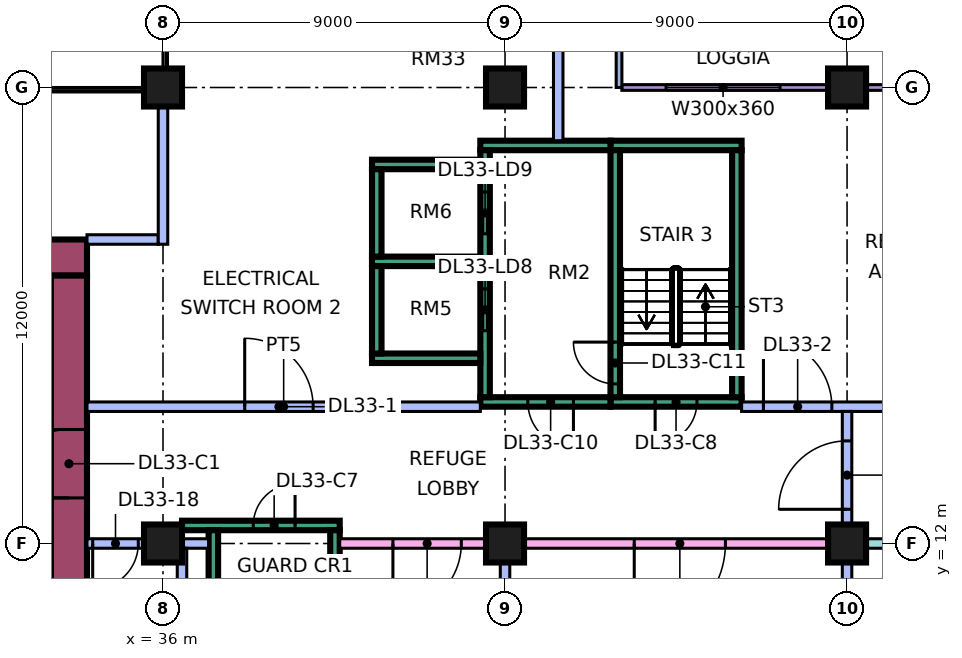
"""IFC4 building model, lengths in metres.
Left out: names, types, materials, properties, quantities, classifications, styles, units other than length and angle.
Written with IfcOpenShell. Run it as: python <this file> out.ifc"""

import sys

from ifc_helpers import new_model, si_unit, direction, frame, frame_2d, origin, origin_2d, place, context, subcontext, project, spatial, rectangle, extrude, element, fill, save


model = new_model("IFC4")
c1 = context("Model", 3, precision=1e-05, world=origin(), true_north=direction((0.0, 1.0)))
c2 = subcontext(c1, "Body", "Model", "MODEL_VIEW")
j1 = project(units=[si_unit("LENGTHUNIT", "METRE"), si_unit("PLANEANGLEUNIT", "RADIAN")], contexts=[c1])
p1 = place(None, origin())
s1 = spatial("IfcSite", under=j1, at=p1, CompositionType="ELEMENT")
p2 = place(p1, origin())
s2 = spatial("IfcBuilding", under=s1, at=p2, CompositionType="ELEMENT")
p3 = place(p2, frame((0.0, 0.0, 140.65)))
s3 = spatial("IfcBuildingStorey", under=s2, at=p3, CompositionType="ELEMENT", Elevation=140.65)
for number, where, z_axis, x_axis in (
    (1, (36.0, 12.0, 0.0), (0.0, 0.0, 1.0), (1.0, 0.0, 0.0)),
    (2, (36.0, 24.0, 0.0), (0.0, 0.0, 1.0), (1.0, 0.0, 0.0)),
    (3, (45.0, 12.0, 0.0), (0.0, 0.0, 1.0), (1.0, 0.0, 0.0)),
    (4, (45.0, 24.0, 0.0), (0.0, 0.0, 1.0), (1.0, 0.0, 0.0)),
    (5, (54.0, 12.0, 0.0), (0.0, 0.0, 1.0), (1.0, 0.0, 0.0)),
    (6, (54.0, 24.0, 0.0), (0.0, 0.0, 1.0), (1.0, 0.0, 0.0)),
):
    element("IfcColumn", number, at=place(p3, frame(where, z_axis=z_axis, x_axis=x_axis)), inside=s3, PredefinedType="COLUMN", context=c2, shape_type="SweptSolid", body=[
        extrude(rectangle(XDim=1.0, YDim=1.0, at=origin_2d()), origin(), (0.0, 0.0, 1.0), 5.5),
    ])
p4 = place(p3, frame((9.0, 19.525, 0.0), z_axis=(0.0, 0.0, 1.0), x_axis=(1.0, 0.0, 0.0)))
e7 = element("IfcWall", 7, at=p4, inside=s3, PredefinedType="SHEAR", context=c2, shape_type="SweptSolid", body=[
    extrude(rectangle(XDim=25.0, YDim=0.95, at=frame_2d((12.5, 0.0))), origin(), (0.0, 0.0, 1.0), 5.5),
])
p5 = place(p4, frame((19.1, 0.0, 0.0)))
e8 = element("IfcOpeningElement", 8, at=p5, cuts=e7, PredefinedType="OPENING", context=c2, shape_type="SweptSolid", body=[
    extrude(rectangle(XDim=1.8, YDim=2.4, at=frame_2d((0.9, 1.2))), frame((0.0, 0.485, 0.0), z_axis=(0.0, -1.0, 0.0), x_axis=(1.0, 0.0, 0.0)), (0.0, 0.0, 1.0), 0.97),
])
p6 = place(p3, frame((33.525, 7.95, 0.0), z_axis=(0.0, 0.0, 1.0), x_axis=(0.0, 1.0, 0.0)))
e9 = element("IfcWall", 9, at=p6, inside=s3, PredefinedType="SHEAR", context=c2, shape_type="SweptSolid", body=[
    extrude(rectangle(XDim=11.1, YDim=0.95, at=frame_2d((5.55, 0.0))), origin(), (0.0, 0.0, 1.0), 5.5),
])
p7 = place(p6, frame((5.25, 0.0, 0.0)))
e10 = element("IfcOpeningElement", 10, at=p7, cuts=e9, PredefinedType="OPENING", context=c2, shape_type="SweptSolid", body=[
    extrude(rectangle(XDim=1.8, YDim=2.4, at=frame_2d((0.9, 1.2))), frame((0.0, 0.485, 0.0), z_axis=(0.0, -1.0, 0.0), x_axis=(1.0, 0.0, 0.0)), (0.0, 0.0, 1.0), 0.97),
])
p8 = place(p3, frame((36.5, 12.475, 0.0), z_axis=(0.0, 0.0, 1.0), x_axis=(1.0, 0.0, 0.0)))
e11 = element("IfcWall", 11, at=p8, inside=s3, PredefinedType="SHEAR", context=c2, shape_type="SweptSolid", body=[
    extrude(rectangle(XDim=4.15, YDim=0.25, at=frame_2d((2.075, 0.0))), origin(), (0.0, 0.0, 1.0), 5.5),
])
p9 = place(p8, frame((1.875, 0.0, 0.0)))
e12 = element("IfcOpeningElement", 12, at=p9, cuts=e11, PredefinedType="OPENING", context=c2, shape_type="SweptSolid", body=[
    extrude(rectangle(XDim=1.1, YDim=2.2, at=frame_2d((0.55, 1.1))), frame((0.0, 0.135, 0.0), z_axis=(0.0, -1.0, 0.0), x_axis=(1.0, 0.0, 0.0)), (0.0, 0.0, 1.0), 0.27),
])
for number, where, z_axis, x_axis in (
    (13, (37.325, 5.85, 0.0), (0.0, 0.0, 1.0), (0.0, 1.0, 0.0)),
    (14, (40.525, 5.85, 0.0), (0.0, 0.0, 1.0), (0.0, 1.0, 0.0)),
):
    element("IfcWall", number, at=place(p3, frame(where, z_axis=z_axis, x_axis=x_axis)), inside=s3, PredefinedType="SHEAR", context=c2, shape_type="SweptSolid", body=[
        extrude(rectangle(XDim=6.5, YDim=0.25, at=frame_2d((3.25, 0.0))), origin(), (0.0, 0.0, 1.0), 5.5),
    ])
p10 = place(p3, frame((47.775, 15.725, 0.0), z_axis=(0.0, 0.0, 1.0), x_axis=(1.0, 0.0, 0.0)))
e15 = element("IfcWall", 15, at=p10, inside=s3, PredefinedType="SHEAR", context=c2, shape_type="SweptSolid", body=[
    extrude(rectangle(XDim=3.45, YDim=0.25, at=frame_2d((1.725, 0.0))), origin(), (0.0, 0.0, 1.0), 5.5),
])
p11 = place(p10, frame((1.175, 0.0, 0.0)))
e16 = element("IfcOpeningElement", 16, at=p11, cuts=e15, PredefinedType="OPENING", context=c2, shape_type="SweptSolid", body=[
    extrude(rectangle(XDim=1.1, YDim=2.2, at=frame_2d((0.55, 1.1))), frame((0.0, 0.135, 0.0), z_axis=(0.0, -1.0, 0.0), x_axis=(1.0, 0.0, 0.0)), (0.0, 0.0, 1.0), 0.27),
])
p12 = place(p3, frame((47.775, 22.475, 0.0), z_axis=(0.0, 0.0, 1.0), x_axis=(1.0, 0.0, 0.0)))
e17 = element("IfcWall", 17, at=p12, inside=s3, PredefinedType="SHEAR", context=c2, shape_type="SweptSolid", body=[
    extrude(rectangle(XDim=3.45, YDim=0.25, at=frame_2d((1.725, 0.0))), origin(), (0.0, 0.0, 1.0), 5.5),
])
p13 = place(p3, frame((47.9, 15.85, 0.0), z_axis=(0.0, 0.0, 1.0), x_axis=(0.0, 1.0, 0.0)))
e18 = element("IfcWall", 18, at=p13, inside=s3, PredefinedType="SHEAR", context=c2, shape_type="SweptSolid", body=[
    extrude(rectangle(XDim=6.5, YDim=0.25, at=frame_2d((3.25, 0.0))), origin(), (0.0, 0.0, 1.0), 5.5),
])
p14 = place(p13, frame((0.35, 0.0, 0.0)))
e19 = element("IfcOpeningElement", 19, at=p14, cuts=e18, PredefinedType="OPENING", context=c2, shape_type="SweptSolid", body=[
    extrude(rectangle(XDim=1.1, YDim=2.2, at=frame_2d((0.55, 1.1))), frame((0.0, 0.135, 0.0), z_axis=(0.0, -1.0, 0.0), x_axis=(1.0, 0.0, 0.0)), (0.0, 0.0, 1.0), 0.27),
])
p15 = place(p3, frame((51.1, 15.85, 0.0), z_axis=(0.0, 0.0, 1.0), x_axis=(0.0, 1.0, 0.0)))
e20 = element("IfcWall", 20, at=p15, inside=s3, PredefinedType="SHEAR", context=c2, shape_type="SweptSolid", body=[
    extrude(rectangle(XDim=6.5, YDim=0.25, at=frame_2d((3.25, 0.0))), origin(), (0.0, 0.0, 1.0), 5.5),
])
p16 = place(p3, frame((44.35, 15.725, 0.0), z_axis=(0.0, 0.0, 1.0), x_axis=(1.0, 0.0, 0.0)))
e21 = element("IfcWall", 21, at=p16, inside=s3, PredefinedType="SHEAR", context=c2, shape_type="SweptSolid", body=[
    extrude(rectangle(XDim=3.425, YDim=0.25, at=frame_2d((1.712, 0.0))), origin(), (0.0, 0.0, 1.0), 5.5),
])
p17 = place(p16, frame((1.25, 0.0, 0.0)))
e22 = element("IfcOpeningElement", 22, at=p17, cuts=e21, PredefinedType="OPENING", context=c2, shape_type="SweptSolid", body=[
    extrude(rectangle(XDim=1.2, YDim=2.2, at=frame_2d((0.6, 1.1))), frame((0.0, 0.135, 0.0), z_axis=(0.0, -1.0, 0.0), x_axis=(1.0, 0.0, 0.0)), (0.0, 0.0, 1.0), 0.27),
])
p18 = place(p3, frame((44.35, 22.475, 0.0), z_axis=(0.0, 0.0, 1.0), x_axis=(1.0, 0.0, 0.0)))
e23 = element("IfcWall", 23, at=p18, inside=s3, PredefinedType="SHEAR", context=c2, shape_type="SweptSolid", body=[
    extrude(rectangle(XDim=3.425, YDim=0.25, at=frame_2d((1.712, 0.0))), origin(), (0.0, 0.0, 1.0), 5.5),
])
p19 = place(p3, frame((44.475, 15.85, 0.0), z_axis=(0.0, 0.0, 1.0), x_axis=(0.0, 1.0, 0.0)))
e24 = element("IfcWall", 24, at=p19, inside=s3, PredefinedType="SHEAR", context=c2, shape_type="SweptSolid", body=[
    extrude(rectangle(XDim=6.5, YDim=0.25, at=frame_2d((3.25, 0.0))), origin(), (0.0, 0.0, 1.0), 5.5),
])
p20 = place(p19, frame((1.75, 0.0, 0.0)))
e25 = element("IfcOpeningElement", 25, at=p20, cuts=e24, PredefinedType="OPENING", context=c2, shape_type="SweptSolid", body=[
    extrude(rectangle(XDim=1.1, YDim=2.2, at=frame_2d((0.55, 1.1))), frame((0.0, 0.135, 0.0), z_axis=(0.0, -1.0, 0.0), x_axis=(1.0, 0.0, 0.0)), (0.0, 0.0, 1.0), 0.27),
])
p21 = place(p19, frame((4.3, 0.0, 0.0)))
e26 = element("IfcOpeningElement", 26, at=p21, cuts=e24, PredefinedType="OPENING", context=c2, shape_type="SweptSolid", body=[
    extrude(rectangle(XDim=1.1, YDim=2.2, at=frame_2d((0.55, 1.1))), frame((0.0, 0.135, 0.0), z_axis=(0.0, -1.0, 0.0), x_axis=(1.0, 0.0, 0.0)), (0.0, 0.0, 1.0), 0.27),
])
for number, where, z_axis, x_axis in (
    (27, (41.5, 16.875, 0.0), (0.0, 0.0, 1.0), (1.0, 0.0, 0.0)),
    (28, (41.5, 19.425, 0.0), (0.0, 0.0, 1.0), (1.0, 0.0, 0.0)),
    (29, (41.5, 21.975, 0.0), (0.0, 0.0, 1.0), (1.0, 0.0, 0.0)),
):
    element("IfcWall", number, at=place(p3, frame(where, z_axis=z_axis, x_axis=x_axis)), inside=s3, PredefinedType="SHEAR", context=c2, shape_type="SweptSolid", body=[
        extrude(rectangle(XDim=2.85, YDim=0.25, at=frame_2d((1.425, 0.0))), origin(), (0.0, 0.0, 1.0), 5.5),
    ])
for number, where, z_axis, x_axis in (
    (30, (41.625, 17.0, 0.0), (0.0, 0.0, 1.0), (0.0, 1.0, 0.0)),
    (31, (41.625, 19.55, 0.0), (0.0, 0.0, 1.0), (0.0, 1.0, 0.0)),
):
    element("IfcWall", number, at=place(p3, frame(where, z_axis=z_axis, x_axis=x_axis)), inside=s3, PredefinedType="SHEAR", context=c2, shape_type="SweptSolid", body=[
        extrude(rectangle(XDim=2.3, YDim=0.25, at=frame_2d((1.15, 0.0))), origin(), (0.0, 0.0, 1.0), 5.5),
    ])
p22 = place(p3, frame((59.925, 24.0, 0.0), z_axis=(0.0, 0.0, 1.0), x_axis=(-1.0, 0.0, 0.0)))
e32 = element("IfcWall", 32, at=p22, inside=s3, PredefinedType="SOLIDWALL", context=c2, shape_type="SweptSolid", body=[
    extrude(rectangle(XDim=11.85, YDim=0.15, at=frame_2d((5.925, 0.0))), origin(), (0.0, 0.0, 1.0), 5.05),
])
p23 = place(p22, frame((1.725, 0.0, 0.45)))
e33 = element("IfcOpeningElement", 33, at=p23, cuts=e32, PredefinedType="OPENING", context=c2, shape_type="SweptSolid", body=[
    extrude(rectangle(XDim=3.0, YDim=3.6, at=frame_2d((1.5, 1.8))), frame((0.0, 0.085, 0.0), z_axis=(0.0, -1.0, 0.0), x_axis=(1.0, 0.0, 0.0)), (0.0, 0.0, 1.0), 0.17),
])
p24 = place(p22, frame((7.688, 0.0, 0.45)))
e34 = element("IfcOpeningElement", 34, at=p24, cuts=e32, PredefinedType="OPENING", context=c2, shape_type="SweptSolid", body=[
    extrude(rectangle(XDim=3.0, YDim=3.6, at=frame_2d((1.5, 1.8))), frame((0.0, 0.085, 0.0), z_axis=(0.0, -1.0, 0.0), x_axis=(1.0, 0.0, 0.0)), (0.0, 0.0, 1.0), 0.17),
])
p25 = place(p3, frame((48.0, 25.5, 0.0), z_axis=(0.0, 0.0, 1.0), x_axis=(0.0, -1.0, 0.0)))
e35 = element("IfcWall", 35, at=p25, inside=s3, PredefinedType="SOLIDWALL", context=c2, shape_type="SweptSolid", body=[
    extrude(rectangle(XDim=1.5, YDim=0.15, at=frame_2d((0.75, 0.0))), origin(), (0.0, 0.0, 1.0), 5.05),
])
p26 = place(p3, frame((34.0, 12.0, 0.0), z_axis=(0.0, 0.0, 1.0), x_axis=(1.0, 0.0, 0.0)))
e36 = element("IfcWall", 36, at=p26, inside=s3, PredefinedType="PARTITIONING", context=c2, shape_type="SweptSolid", body=[
    extrude(rectangle(XDim=3.2, YDim=0.25, at=frame_2d((1.6, 0.0))), origin(), (0.0, 0.0, 1.0), 5.05),
])
p27 = place(p26, frame((0.15, 0.0, 0.0)))
e37 = element("IfcOpeningElement", 37, at=p27, cuts=e36, PredefinedType="OPENING", context=c2, shape_type="SweptSolid", body=[
    extrude(rectangle(XDim=1.2, YDim=2.1, at=frame_2d((0.6, 1.05))), frame((0.0, 0.135, 0.0), z_axis=(0.0, -1.0, 0.0), x_axis=(1.0, 0.0, 0.0)), (0.0, 0.0, 1.0), 0.27),
])
p28 = place(p3, frame((34.0, 15.6, 0.0), z_axis=(0.0, 0.0, 1.0), x_axis=(1.0, 0.0, 0.0)))
e38 = element("IfcWall", 38, at=p28, inside=s3, PredefinedType="PARTITIONING", context=c2, shape_type="SweptSolid", body=[
    extrude(rectangle(XDim=10.35, YDim=0.25, at=frame_2d((5.175, 0.0))), origin(), (0.0, 0.0, 1.0), 5.05),
])
p29 = place(p28, frame((4.15, 0.0, 0.0)))
e39 = element("IfcOpeningElement", 39, at=p29, cuts=e38, PredefinedType="OPENING", context=c2, shape_type="SweptSolid", body=[
    extrude(rectangle(XDim=1.8, YDim=2.1, at=frame_2d((0.9, 1.05))), frame((0.0, 0.135, 0.0), z_axis=(0.0, -1.0, 0.0), x_axis=(1.0, 0.0, 0.0)), (0.0, 0.0, 1.0), 0.27),
])
p30 = place(p3, frame((34.0, 20.0, 0.0), z_axis=(0.0, 0.0, 1.0), x_axis=(1.0, 0.0, 0.0)))
e40 = element("IfcWall", 40, at=p30, inside=s3, PredefinedType="PARTITIONING", context=c2, shape_type="SweptSolid", body=[
    extrude(rectangle(XDim=1.875, YDim=0.25, at=frame_2d((0.938, 0.0))), origin(), (0.0, 0.0, 1.0), 5.05),
])
p31 = place(p3, frame((36.0, 19.875, 0.0), z_axis=(0.0, 0.0, 1.0), x_axis=(0.0, 1.0, 0.0)))
e41 = element("IfcWall", 41, at=p31, inside=s3, PredefinedType="PARTITIONING", context=c2, shape_type="SweptSolid", body=[
    extrude(rectangle(XDim=4.125, YDim=0.25, at=frame_2d((2.062, 0.0))), origin(), (0.0, 0.0, 1.0), 5.05),
])
p32 = place(p3, frame((36.5, 6.875, 0.0), z_axis=(0.0, 0.0, 1.0), x_axis=(0.0, 1.0, 0.0)))
e42 = element("IfcWall", 42, at=p32, inside=s3, PredefinedType="PARTITIONING", context=c2, shape_type="SweptSolid", body=[
    extrude(rectangle(XDim=5.0, YDim=0.25, at=frame_2d((2.5, 0.0))), origin(), (0.0, 0.0, 1.0), 5.05),
])
p33 = place(p3, frame((40.65, 12.0, 0.0), z_axis=(0.0, 0.0, 1.0), x_axis=(1.0, 0.0, 0.0)))
e43 = element("IfcWall", 43, at=p33, inside=s3, PredefinedType="PARTITIONING", context=c2, shape_type="SweptSolid", body=[
    extrude(rectangle(XDim=13.225, YDim=0.25, at=frame_2d((6.613, 0.0))), origin(), (0.0, 0.0, 1.0), 2.45),
])
p34 = place(p33, frame((1.4, 0.0, 0.0)))
e44 = element("IfcOpeningElement", 44, at=p34, cuts=e43, PredefinedType="OPENING", context=c2, shape_type="SweptSolid", body=[
    extrude(rectangle(XDim=1.8, YDim=2.1, at=frame_2d((0.9, 1.05))), frame((0.0, 0.135, 0.0), z_axis=(0.0, -1.0, 0.0), x_axis=(1.0, 0.0, 0.0)), (0.0, 0.0, 1.0), 0.27),
])
p35 = place(p33, frame((7.75, 0.0, 0.0)))
e45 = element("IfcOpeningElement", 45, at=p35, cuts=e43, PredefinedType="OPENING", context=c2, shape_type="SweptSolid", body=[
    extrude(rectangle(XDim=2.4, YDim=2.1, at=frame_2d((1.2, 1.05))), frame((0.0, 0.135, 0.0), z_axis=(0.0, -1.0, 0.0), x_axis=(1.0, 0.0, 0.0)), (0.0, 0.0, 1.0), 0.27),
])
p36 = place(p3, frame((45.0, 0.0, 0.0), z_axis=(0.0, 0.0, 1.0), x_axis=(0.0, 1.0, 0.0)))
e46 = element("IfcWall", 46, at=p36, inside=s3, PredefinedType="PARTITIONING", context=c2, shape_type="SweptSolid", body=[
    extrude(rectangle(XDim=11.875, YDim=0.25, at=frame_2d((5.938, 0.0))), origin(), (0.0, 0.0, 1.0), 5.05),
])
p37 = place(p3, frame((46.4, 22.6, 0.0), z_axis=(0.0, 0.0, 1.0), x_axis=(0.0, 1.0, 0.0)))
e47 = element("IfcWall", 47, at=p37, inside=s3, PredefinedType="PARTITIONING", context=c2, shape_type="SweptSolid", body=[
    extrude(rectangle(XDim=2.75, YDim=0.25, at=frame_2d((1.375, 0.0))), origin(), (0.0, 0.0, 1.0), 5.05),
])
p38 = place(p3, frame((51.225, 15.6, 0.0), z_axis=(0.0, 0.0, 1.0), x_axis=(1.0, 0.0, 0.0)))
e48 = element("IfcWall", 48, at=p38, inside=s3, PredefinedType="PARTITIONING", context=c2, shape_type="SweptSolid", body=[
    extrude(rectangle(XDim=7.575, YDim=0.25, at=frame_2d((3.788, 0.0))), origin(), (0.0, 0.0, 1.0), 5.05),
])
p39 = place(p38, frame((0.575, 0.0, 0.0)))
e49 = element("IfcOpeningElement", 49, at=p39, cuts=e48, PredefinedType="OPENING", context=c2, shape_type="SweptSolid", body=[
    extrude(rectangle(XDim=1.8, YDim=2.1, at=frame_2d((0.9, 1.05))), frame((0.0, 0.135, 0.0), z_axis=(0.0, -1.0, 0.0), x_axis=(1.0, 0.0, 0.0)), (0.0, 0.0, 1.0), 0.27),
])
p40 = place(p3, frame((54.0, 0.074, 0.0), z_axis=(0.0, 0.0, 1.0), x_axis=(0.0, 1.0, 0.0)))
e50 = element("IfcWall", 50, at=p40, inside=s3, PredefinedType="PARTITIONING", context=c2, shape_type="SweptSolid", body=[
    extrude(rectangle(XDim=15.401, YDim=0.25, at=frame_2d((7.701, 0.0))), origin(), (0.0, 0.0, 1.0), 5.05),
])
p41 = place(p40, frame((12.826, 0.0, 0.0)))
e51 = element("IfcOpeningElement", 51, at=p41, cuts=e50, PredefinedType="OPENING", context=c2, shape_type="SweptSolid", body=[
    extrude(rectangle(XDim=1.8, YDim=2.1, at=frame_2d((0.9, 1.05))), frame((0.0, 0.135, 0.0), z_axis=(0.0, -1.0, 0.0), x_axis=(1.0, 0.0, 0.0)), (0.0, 0.0, 1.0), 0.27),
])
p42 = place(p3, frame((54.125, 12.0, 0.0), z_axis=(0.0, 0.0, 1.0), x_axis=(1.0, 0.0, 0.0)))
e52 = element("IfcWall", 52, at=p42, inside=s3, PredefinedType="PARTITIONING", context=c2, shape_type="SweptSolid", body=[
    extrude(rectangle(XDim=17.875, YDim=0.25, at=frame_2d((8.938, 0.0))), origin(), (0.0, 0.0, 1.0), 2.45),
])
p43 = place(p42, frame((3.275, 0.0, 0.0)))
e53 = element("IfcOpeningElement", 53, at=p43, cuts=e52, PredefinedType="OPENING", context=c2, shape_type="SweptSolid", body=[
    extrude(rectangle(XDim=2.4, YDim=2.1, at=frame_2d((1.2, 1.05))), frame((0.0, 0.135, 0.0), z_axis=(0.0, -1.0, 0.0), x_axis=(1.0, 0.0, 0.0)), (0.0, 0.0, 1.0), 0.27),
])
p44 = place(p24, origin())
e54 = element("IfcWindow", 54, at=p44, inside=s3, PartitioningType="SINGLE_PANEL", PredefinedType="WINDOW", context=c2, shape_type="SweptSolid", body=[
    extrude(rectangle(XDim=3.0, YDim=3.6, at=frame_2d((1.5, 1.8))), frame((0.0, 0.03, 0.0), z_axis=(0.0, -1.0, 0.0), x_axis=(1.0, 0.0, 0.0)), (0.0, 0.0, 1.0), 0.06),
])
fill(e34, e54)
p45 = place(p7, origin())
e55 = element("IfcDoor", 55, at=p45, inside=s3, OperationType="DOUBLE_DOOR_SINGLE_SWING", PredefinedType="DOOR", context=c2, shape_type="SweptSolid", body=[
    extrude(rectangle(XDim=1.8, YDim=2.4, at=frame_2d((0.9, 1.2))), frame((0.0, 0.025, 0.0), z_axis=(0.0, -1.0, 0.0), x_axis=(1.0, 0.0, 0.0)), (0.0, 0.0, 1.0), 0.05),
])
fill(e10, e55)
p46 = place(p9, frame((1.1, 0.0, 0.0), z_axis=(0.0, 0.0, 1.0), x_axis=(-1.0, 0.0, 0.0)))
e56 = element("IfcDoor", 56, at=p46, inside=s3, OperationType="SINGLE_SWING_RIGHT", PredefinedType="DOOR", context=c2, shape_type="SweptSolid", body=[
    extrude(rectangle(XDim=1.1, YDim=2.2, at=frame_2d((0.55, 1.1))), frame((0.0, 0.025, 0.0), z_axis=(0.0, -1.0, 0.0), x_axis=(1.0, 0.0, 0.0)), (0.0, 0.0, 1.0), 0.05),
])
fill(e12, e56)
p47 = place(p11, frame((1.1, 0.0, 0.0), z_axis=(0.0, 0.0, 1.0), x_axis=(-1.0, 0.0, 0.0)))
e57 = element("IfcDoor", 57, at=p47, inside=s3, OperationType="SINGLE_SWING_LEFT", PredefinedType="DOOR", context=c2, shape_type="SweptSolid", body=[
    extrude(rectangle(XDim=1.1, YDim=2.2, at=frame_2d((0.55, 1.1))), frame((0.0, 0.025, 0.0), z_axis=(0.0, -1.0, 0.0), x_axis=(1.0, 0.0, 0.0)), (0.0, 0.0, 1.0), 0.05),
])
fill(e16, e57)
p48 = place(p17, origin())
e58 = element("IfcDoor", 58, at=p48, inside=s3, OperationType="SINGLE_SWING_RIGHT", PredefinedType="DOOR", context=c2, shape_type="SweptSolid", body=[
    extrude(rectangle(XDim=1.2, YDim=2.2, at=frame_2d((0.6, 1.1))), frame((0.0, 0.025, 0.0), z_axis=(0.0, -1.0, 0.0), x_axis=(1.0, 0.0, 0.0)), (0.0, 0.0, 1.0), 0.05),
])
fill(e22, e58)
p49 = place(p14, frame((1.1, 0.0, 0.0), z_axis=(0.0, 0.0, 1.0), x_axis=(-1.0, 0.0, 0.0)))
e59 = element("IfcDoor", 59, at=p49, inside=s3, OperationType="SINGLE_SWING_RIGHT", PredefinedType="DOOR", context=c2, shape_type="SweptSolid", body=[
    extrude(rectangle(XDim=1.1, YDim=2.2, at=frame_2d((0.55, 1.1))), frame((0.0, 0.025, 0.0), z_axis=(0.0, -1.0, 0.0), x_axis=(1.0, 0.0, 0.0)), (0.0, 0.0, 1.0), 0.05),
])
fill(e19, e59)
p50 = place(p20, origin())
e60 = element("IfcDoor", 60, at=p50, inside=s3, OperationType="DOUBLE_DOOR_SLIDING", PredefinedType="DOOR", context=c2, shape_type="SweptSolid", body=[
    extrude(rectangle(XDim=1.1, YDim=2.2, at=frame_2d((0.55, 1.1))), frame((0.0, 0.025, 0.0), z_axis=(0.0, -1.0, 0.0), x_axis=(1.0, 0.0, 0.0)), (0.0, 0.0, 1.0), 0.05),
])
fill(e25, e60)
p51 = place(p21, origin())
e61 = element("IfcDoor", 61, at=p51, inside=s3, OperationType="DOUBLE_DOOR_SLIDING", PredefinedType="DOOR", context=c2, shape_type="SweptSolid", body=[
    extrude(rectangle(XDim=1.1, YDim=2.2, at=frame_2d((0.55, 1.1))), frame((0.0, 0.025, 0.0), z_axis=(0.0, -1.0, 0.0), x_axis=(1.0, 0.0, 0.0)), (0.0, 0.0, 1.0), 0.05),
])
fill(e26, e61)
p52 = place(p29, origin())
e62 = element("IfcDoor", 62, at=p52, inside=s3, OperationType="DOUBLE_DOOR_SINGLE_SWING", PredefinedType="DOOR", context=c2, shape_type="SweptSolid", body=[
    extrude(rectangle(XDim=1.8, YDim=2.1, at=frame_2d((0.9, 1.05))), frame((0.0, 0.025, 0.0), z_axis=(0.0, -1.0, 0.0), x_axis=(1.0, 0.0, 0.0)), (0.0, 0.0, 1.0), 0.05),
])
fill(e39, e62)
p53 = place(p39, origin())
e63 = element("IfcDoor", 63, at=p53, inside=s3, OperationType="DOUBLE_DOOR_SINGLE_SWING", PredefinedType="DOOR", context=c2, shape_type="SweptSolid", body=[
    extrude(rectangle(XDim=1.8, YDim=2.1, at=frame_2d((0.9, 1.05))), frame((0.0, 0.025, 0.0), z_axis=(0.0, -1.0, 0.0), x_axis=(1.0, 0.0, 0.0)), (0.0, 0.0, 1.0), 0.05),
])
fill(e49, e63)
p54 = place(p34, frame((1.8, 0.0, 0.0), z_axis=(0.0, 0.0, 1.0), x_axis=(-1.0, 0.0, 0.0)))
e64 = element("IfcDoor", 64, at=p54, inside=s3, OperationType="DOUBLE_DOOR_SINGLE_SWING", PredefinedType="DOOR", context=c2, shape_type="SweptSolid", body=[
    extrude(rectangle(XDim=1.8, YDim=2.1, at=frame_2d((0.9, 1.05))), frame((0.0, 0.025, 0.0), z_axis=(0.0, -1.0, 0.0), x_axis=(1.0, 0.0, 0.0)), (0.0, 0.0, 1.0), 0.05),
])
fill(e44, e64)
p55 = place(p35, frame((2.4, 0.0, 0.0), z_axis=(0.0, 0.0, 1.0), x_axis=(-1.0, 0.0, 0.0)))
e65 = element("IfcDoor", 65, at=p55, inside=s3, OperationType="DOUBLE_DOOR_SINGLE_SWING", PredefinedType="DOOR", context=c2, shape_type="SweptSolid", body=[
    extrude(rectangle(XDim=2.4, YDim=2.1, at=frame_2d((1.2, 1.05))), frame((0.0, 0.025, 0.0), z_axis=(0.0, -1.0, 0.0), x_axis=(1.0, 0.0, 0.0)), (0.0, 0.0, 1.0), 0.05),
])
fill(e45, e65)
p56 = place(p27, frame((1.2, 0.0, 0.0), z_axis=(0.0, 0.0, 1.0), x_axis=(-1.0, 0.0, 0.0)))
e66 = element("IfcDoor", 66, at=p56, inside=s3, OperationType="SINGLE_SWING_LEFT", PredefinedType="DOOR", context=c2, shape_type="SweptSolid", body=[
    extrude(rectangle(XDim=1.2, YDim=2.1, at=frame_2d((0.6, 1.05))), frame((0.0, 0.025, 0.0), z_axis=(0.0, -1.0, 0.0), x_axis=(1.0, 0.0, 0.0)), (0.0, 0.0, 1.0), 0.05),
])
fill(e37, e66)
p57 = place(p41, origin())
e67 = element("IfcDoor", 67, at=p57, inside=s3, OperationType="DOUBLE_DOOR_SINGLE_SWING", PredefinedType="DOOR", context=c2, shape_type="SweptSolid", body=[
    extrude(rectangle(XDim=1.8, YDim=2.1, at=frame_2d((0.9, 1.05))), frame((0.0, 0.025, 0.0), z_axis=(0.0, -1.0, 0.0), x_axis=(1.0, 0.0, 0.0)), (0.0, 0.0, 1.0), 0.05),
])
fill(e51, e67)
save(model, sys.argv[1])
